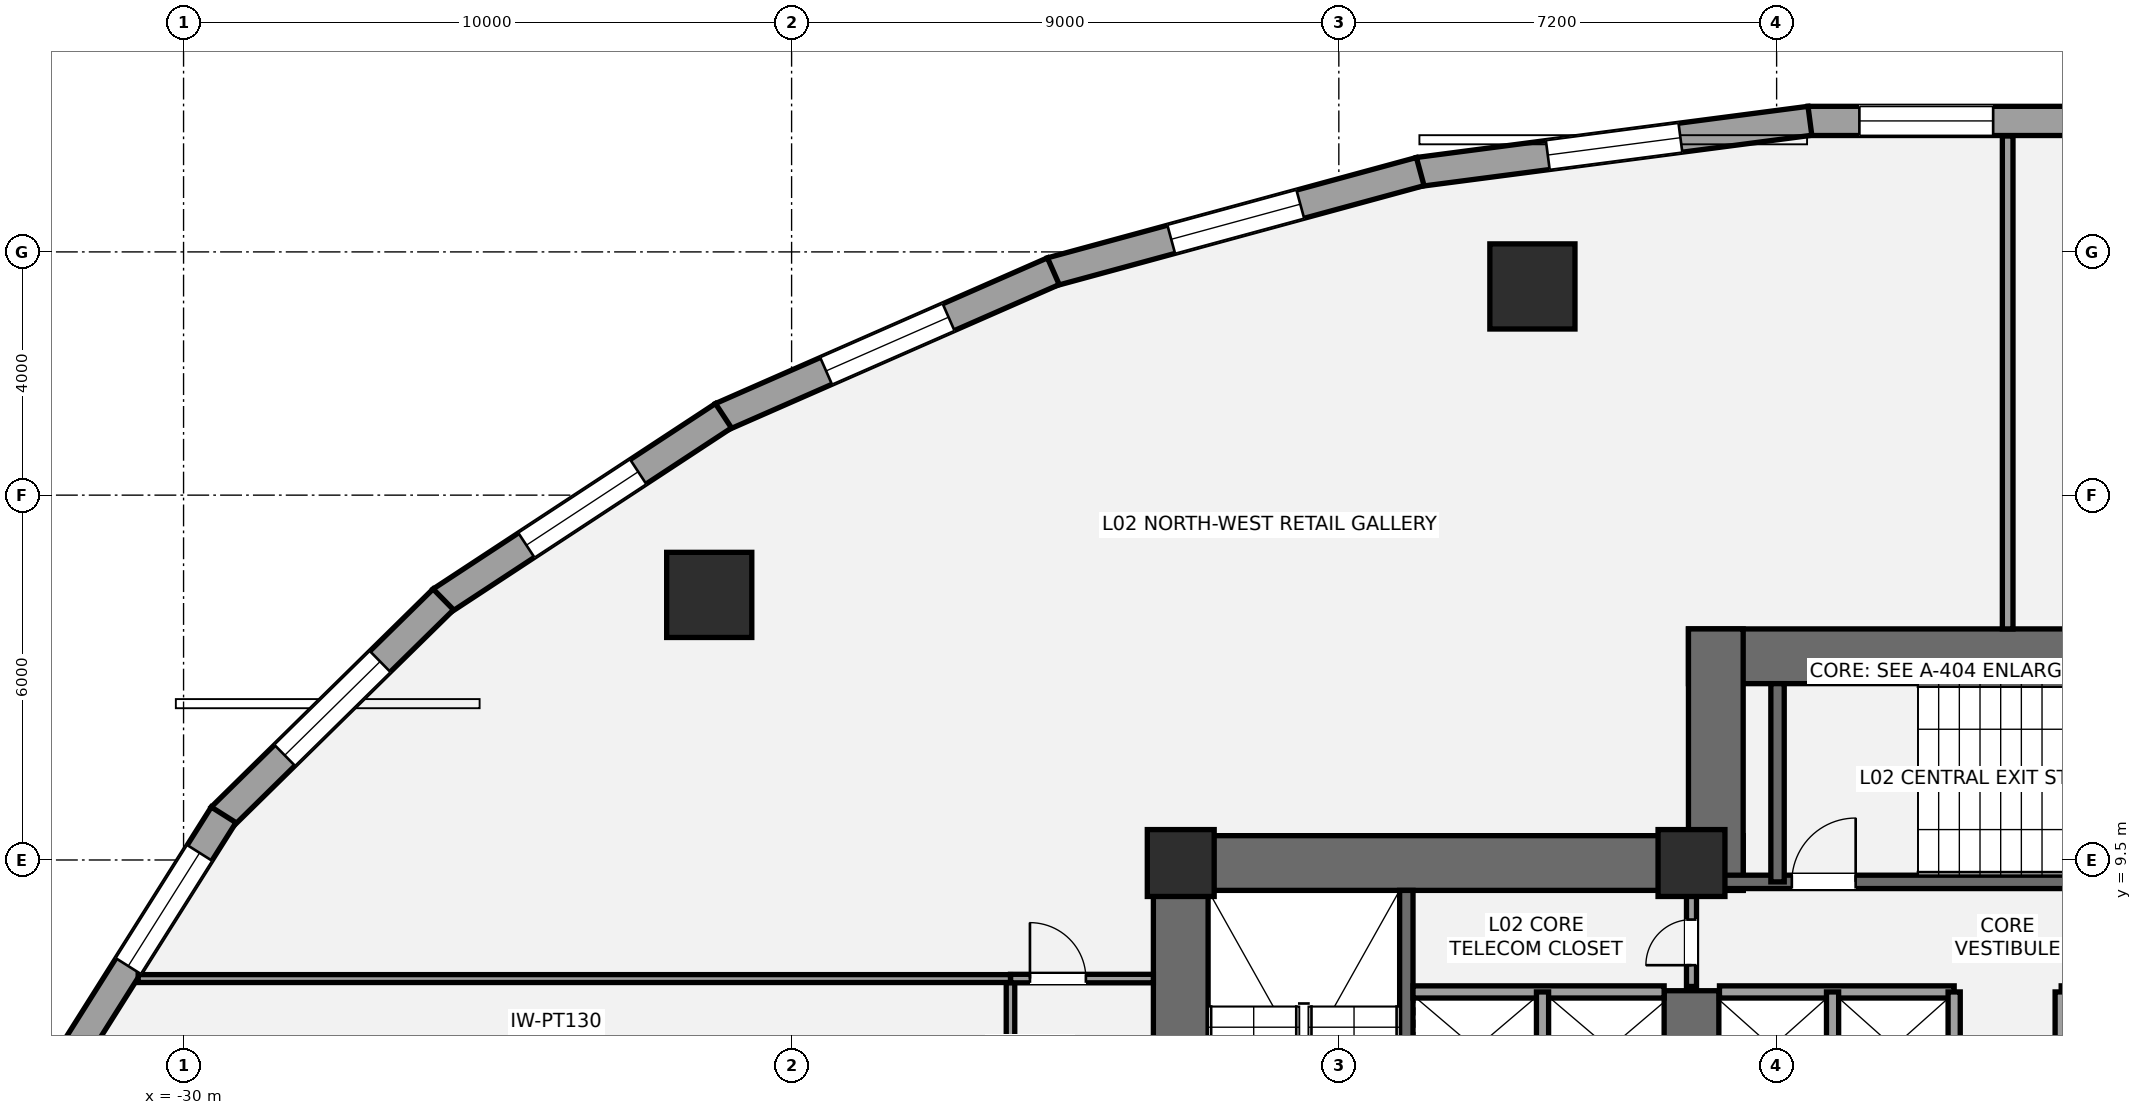
"""IFC4 building model, lengths in metres.
Left out: names, types, materials, properties, quantities, classifications, styles, units other than length and angle.
Written with IfcOpenShell. Run it as: python <this file> out.ifc"""

import sys

from ifc_helpers import new_model, si_unit, direction, frame, frame_2d, origin, origin_2d, place, context, subcontext, project, spatial, rectangle, hollow_circle, extrude, element, fill, save


model = new_model("IFC4")
c1 = context("Model", 3, precision=1e-05, world=origin(), true_north=direction((0.0, 1.0)))
c2 = subcontext(c1, "Body", "Model", "MODEL_VIEW")
j1 = project(units=[si_unit("LENGTHUNIT", "METRE"), si_unit("PLANEANGLEUNIT", "RADIAN")], contexts=[c1])
p1 = place(None, origin())
s1 = spatial("IfcSite", under=j1, at=p1, CompositionType="ELEMENT")
p2 = place(p1, origin())
s2 = spatial("IfcBuilding", under=s1, at=p2, CompositionType="ELEMENT")
p3 = place(p2, frame((0.0, 0.0, 10.2)))
s3 = spatial("IfcBuildingStorey", under=s2, at=p3, CompositionType="ELEMENT", Elevation=10.2)
p4 = place(p3, frame((-13.6, 0.95, 0.0), z_axis=(0.0, 0.0, 1.0), x_axis=(0.0, 1.0, 0.0)))
e1 = element("IfcWall", 1, at=p4, inside=s3, PredefinedType="SHEAR", context=c2, shape_type="SweptSolid", body=[
    extrude(rectangle(XDim=8.95, YDim=0.9, at=frame_2d((4.475, 0.0))), origin(), (0.0, 0.0, 1.0), 4.2),
])
p5 = place(p3, frame((-14.05, 9.45, 0.0), z_axis=(0.0, 0.0, 1.0), x_axis=(1.0, 0.0, 0.0)))
e2 = element("IfcWall", 2, at=p5, inside=s3, PredefinedType="SHEAR", context=c2, shape_type="SweptSolid", body=[
    extrude(rectangle(XDim=9.7, YDim=0.9, at=frame_2d((4.85, 0.0))), origin(), (0.0, 0.0, 1.0), 4.2),
])
p6 = place(p3, frame((-5.2, 5.35, 0.0), z_axis=(0.0, 0.0, 1.0), x_axis=(0.0, 1.0, 0.0)))
e3 = element("IfcWall", 3, at=p6, inside=s3, PredefinedType="SHEAR", context=c2, shape_type="SweptSolid", body=[
    extrude(rectangle(XDim=2.0, YDim=0.9, at=frame_2d((1.0, 0.0))), origin(), (0.0, 0.0, 1.0), 4.2),
])
p7 = place(p3, frame((-9.89, 1.85, 0.0), z_axis=(0.0, 0.0, 1.0), x_axis=(0.0, 1.0, 0.0)))
e4 = element("IfcWall", 4, at=p7, inside=s3, PredefinedType="SHEAR", context=c2, shape_type="SweptSolid", body=[
    extrude(rectangle(XDim=7.15, YDim=0.22, at=frame_2d((3.575, 0.0))), origin(), (0.0, 0.0, 1.0), 4.2),
])
p8 = place(p3, frame((-5.25, 12.85, 0.0), z_axis=(0.0, 0.0, 1.0), x_axis=(1.0, 0.0, 0.0)))
e5 = element("IfcWall", 5, at=p8, inside=s3, PredefinedType="SHEAR", context=c2, shape_type="SweptSolid", body=[
    extrude(rectangle(XDim=10.5, YDim=0.9, at=frame_2d((5.25, 0.0))), origin(), (0.0, 0.0, 1.0), 4.2),
])
p9 = place(p3, frame((-4.8, 9.0, 0.0), z_axis=(0.0, 0.0, 1.0), x_axis=(0.0, 1.0, 0.0)))
e6 = element("IfcWall", 6, at=p9, inside=s3, PredefinedType="SHEAR", context=c2, shape_type="SweptSolid", body=[
    extrude(rectangle(XDim=4.3, YDim=0.9, at=frame_2d((2.15, 0.0))), origin(), (0.0, 0.0, 1.0), 4.2),
])
p10 = place(p3, frame((-4.7, 9.14, 0.0), z_axis=(0.0, 0.0, 1.0), x_axis=(1.0, 0.0, 0.0)))
e7 = element("IfcWall", 7, at=p10, inside=s3, PredefinedType="SHEAR", context=c2, shape_type="SweptSolid", body=[
    extrude(rectangle(XDim=9.3, YDim=0.22, at=frame_2d((4.65, 0.0))), origin(), (0.0, 0.0, 1.0), 4.2),
])
p11 = place(p10, frame((1.15, 0.0, 0.0)))
e8 = element("IfcOpeningElement", 8, at=p11, cuts=e7, PredefinedType="OPENING", context=c2, shape_type="SweptSolid", body=[
    extrude(rectangle(XDim=1.05, YDim=2.15, at=frame_2d((0.525, 1.075))), frame((0.0, 0.12, 0.0), z_axis=(0.0, -1.0, 0.0), x_axis=(1.0, 0.0, 0.0)), (0.0, 0.0, 1.0), 0.24),
])
p12 = place(p3, frame((-3.785, 9.14, 0.0), z_axis=(0.0, 0.0, 1.0), x_axis=(0.0, 1.0, 0.0)))
e9 = element("IfcWall", 9, at=p12, inside=s3, PredefinedType="SHEAR", context=c2, shape_type="SweptSolid", body=[
    extrude(rectangle(XDim=3.26, YDim=0.22, at=frame_2d((1.63, 0.0))), origin(), (0.0, 0.0, 1.0), 4.2),
])
for number, where, z_axis, x_axis in (
    (10, (-13.6, 9.45, 0.0), (0.0, 0.0, 1.0), (1.0, 0.0, 0.0)),
    (11, (-5.2, 9.45, 0.0), (0.0, 0.0, 1.0), (1.0, 0.0, 0.0)),
):
    element("IfcColumn", number, at=place(p3, frame(where, z_axis=z_axis, x_axis=x_axis)), inside=s3, PredefinedType="COLUMN", context=c2, shape_type="SweptSolid", body=[
        extrude(rectangle(XDim=1.1, YDim=1.1, at=origin_2d()), origin(), (0.0, 0.0, 1.0), 4.2),
    ])
for number, where, z_axis, x_axis in (
    (12, (-7.816, 18.932, 0.0), (0.0, 0.0, 1.0), (1.0, 0.0, 0.0)),
    (13, (-21.354, 13.859, 0.0), (0.0, 0.0, 1.0), (1.0, 0.0, 0.0)),
):
    element("IfcColumn", number, at=place(p3, frame(where, z_axis=z_axis, x_axis=x_axis)), inside=s3, PredefinedType="USERDEFINED", context=c2, shape_type="SweptSolid", body=[
        extrude(hollow_circle(Radius=0.7, WallThickness=0.05, at=origin_2d()), origin(), (0.0, 0.0, 1.0), 4.2),
    ])
p13 = place(p3, frame((-3.284, 21.654, 0.0), z_axis=(0.0, 0.0, 1.0), x_axis=(1.0, 0.0, 0.0)))
e14 = element("IfcWall", 14, at=p13, inside=s3, PredefinedType="STANDARD", context=c2, shape_type="SweptSolid", body=[
    extrude(rectangle(XDim=6.567, YDim=0.48, at=frame_2d((3.284, 0.0))), origin(), (0.0, 0.0, 1.0), 3.109),
])
p14 = place(p13, frame((0.845, 0.0, 0.7)))
e15 = element("IfcOpeningElement", 15, at=p14, cuts=e14, PredefinedType="OPENING", context=c2, shape_type="SweptSolid", body=[
    extrude(rectangle(XDim=2.2, YDim=1.95, at=frame_2d((1.1, 0.975))), frame((0.0, 0.25, 0.0), z_axis=(0.0, -1.0, 0.0), x_axis=(1.0, 0.0, 0.0)), (0.0, 0.0, 1.0), 0.5),
])
p15 = place(p3, frame((-9.693, 20.815, 0.0), z_axis=(0.0, 0.0, 1.0), x_axis=(0.991576921472, 0.129519144545, 0.0)))
e16 = element("IfcWall", 16, at=p15, inside=s3, PredefinedType="STANDARD", context=c2, shape_type="SweptSolid", body=[
    extrude(rectangle(XDim=6.496, YDim=0.48, at=frame_2d((3.248, 0.0))), origin(), (0.0, 0.0, 1.0), 3.109),
])
p16 = place(p15, frame((2.148, 0.0, 0.7)))
e17 = element("IfcOpeningElement", 17, at=p16, cuts=e16, PredefinedType="OPENING", context=c2, shape_type="SweptSolid", body=[
    extrude(rectangle(XDim=2.2, YDim=1.95, at=frame_2d((1.1, 0.975))), frame((0.0, 0.25, 0.0), z_axis=(0.0, -1.0, 0.0), x_axis=(1.0, 0.0, 0.0)), (0.0, 0.0, 1.0), 0.5),
])
p17 = place(p3, frame((-15.729, 19.171, 0.0), z_axis=(0.0, 0.0, 1.0), x_axis=(0.964936550718, 0.262483243445, 0.0)))
e18 = element("IfcWall", 18, at=p17, inside=s3, PredefinedType="STANDARD", context=c2, shape_type="SweptSolid", body=[
    extrude(rectangle(XDim=6.288, YDim=0.48, at=frame_2d((3.144, 0.0))), origin(), (0.0, 0.0, 1.0), 3.109),
])
p18 = place(p17, frame((2.044, 0.0, 0.7)))
e19 = element("IfcOpeningElement", 19, at=p18, cuts=e18, PredefinedType="OPENING", context=c2, shape_type="SweptSolid", body=[
    extrude(rectangle(XDim=2.2, YDim=1.95, at=frame_2d((1.1, 0.975))), frame((0.0, 0.25, 0.0), z_axis=(0.0, -1.0, 0.0), x_axis=(1.0, 0.0, 0.0)), (0.0, 0.0, 1.0), 0.5),
])
p19 = place(p3, frame((-21.156, 16.786, 0.0), z_axis=(0.0, 0.0, 1.0), x_axis=(0.91570760638, 0.401845218484, 0.0)))
e20 = element("IfcWall", 20, at=p19, inside=s3, PredefinedType="STANDARD", context=c2, shape_type="SweptSolid", body=[
    extrude(rectangle(XDim=5.963, YDim=0.48, at=frame_2d((2.981, 0.0))), origin(), (0.0, 0.0, 1.0), 3.109),
])
p20 = place(p19, frame((1.882, 0.0, 0.7)))
e21 = element("IfcOpeningElement", 21, at=p20, cuts=e20, PredefinedType="OPENING", context=c2, shape_type="SweptSolid", body=[
    extrude(rectangle(XDim=2.2, YDim=1.95, at=frame_2d((1.1, 0.975))), frame((0.0, 0.25, 0.0), z_axis=(0.0, -1.0, 0.0), x_axis=(1.0, 0.0, 0.0)), (0.0, 0.0, 1.0), 0.5),
])
p21 = place(p3, frame((-25.764, 13.756, 0.0), z_axis=(0.0, 0.0, 1.0), x_axis=(0.835863918172, 0.548936708827, 0.0)))
e22 = element("IfcWall", 22, at=p21, inside=s3, PredefinedType="STANDARD", context=c2, shape_type="SweptSolid", body=[
    extrude(rectangle(XDim=5.555, YDim=0.48, at=frame_2d((2.778, 0.0))), origin(), (0.0, 0.0, 1.0), 3.109),
])
p22 = place(p21, frame((1.678, 0.0, 0.7)))
e23 = element("IfcOpeningElement", 23, at=p22, cuts=e22, PredefinedType="OPENING", context=c2, shape_type="SweptSolid", body=[
    extrude(rectangle(XDim=2.2, YDim=1.95, at=frame_2d((1.1, 0.975))), frame((0.0, 0.25, 0.0), z_axis=(0.0, -1.0, 0.0), x_axis=(1.0, 0.0, 0.0)), (0.0, 0.0, 1.0), 0.5),
])
p23 = place(p3, frame((-29.376, 10.199, 0.0), z_axis=(0.0, 0.0, 1.0), x_axis=(0.713189080178, 0.700971708355, 0.0)))
e24 = element("IfcWall", 24, at=p23, inside=s3, PredefinedType="STANDARD", context=c2, shape_type="SweptSolid", body=[
    extrude(rectangle(XDim=5.116, YDim=0.48, at=frame_2d((2.558, 0.0))), origin(), (0.0, 0.0, 1.0), 3.109),
])
p24 = place(p23, frame((1.458, 0.0, 0.7)))
e25 = element("IfcOpeningElement", 25, at=p24, cuts=e24, PredefinedType="OPENING", context=c2, shape_type="SweptSolid", body=[
    extrude(rectangle(XDim=2.2, YDim=1.95, at=frame_2d((1.1, 0.975))), frame((0.0, 0.25, 0.0), z_axis=(0.0, -1.0, 0.0), x_axis=(1.0, 0.0, 0.0)), (0.0, 0.0, 1.0), 0.5),
])
p25 = place(p3, frame((-31.854, 6.258, 0.0), z_axis=(0.0, 0.0, 1.0), x_axis=(0.53349762721, 0.845801561693, 0.0)))
e26 = element("IfcWall", 26, at=p25, inside=s3, PredefinedType="STANDARD", context=c2, shape_type="SweptSolid", body=[
    extrude(rectangle(XDim=4.711, YDim=0.48, at=frame_2d((2.355, 0.0))), origin(), (0.0, 0.0, 1.0), 3.109),
])
p26 = place(p25, frame((1.771, 0.0, 0.7)))
e27 = element("IfcOpeningElement", 27, at=p26, cuts=e26, PredefinedType="OPENING", context=c2, shape_type="SweptSolid", body=[
    extrude(rectangle(XDim=2.2, YDim=1.95, at=frame_2d((1.1, 0.975))), frame((0.0, 0.25, 0.0), z_axis=(0.0, -1.0, 0.0), x_axis=(1.0, 0.0, 0.0)), (0.0, 0.0, 1.0), 0.5),
])
p27 = place(p3, frame((-9.78, 7.33, 0.0), z_axis=(0.0, 0.0, 1.0), x_axis=(1.0, 0.0, 0.0)))
e28 = element("IfcWall", 28, at=p27, inside=s3, PredefinedType="SOLIDWALL", context=c2, shape_type="SweptSolid", body=[
    extrude(rectangle(XDim=4.13, YDim=0.2, at=frame_2d((2.065, 0.0))), origin(), (0.0, 0.0, 1.0), 3.98),
])
p28 = place(p3, frame((-7.65, 5.47, 0.0), z_axis=(0.0, 0.0, 1.0), x_axis=(0.0, 1.0, 0.0)))
e29 = element("IfcWall", 29, at=p28, inside=s3, PredefinedType="SOLIDWALL", context=c2, shape_type="SweptSolid", body=[
    extrude(rectangle(XDim=1.86, YDim=0.2, at=frame_2d((0.93, 0.0))), origin(), (0.0, 0.0, 1.0), 3.98),
])
for number, where, z_axis, x_axis in (
    (30, (-4.74, 7.33, 0.0), (0.0, 0.0, 1.0), (1.0, 0.0, 0.0)),
    (31, (0.88, 7.33, 0.0), (0.0, 0.0, 1.0), (1.0, 0.0, 0.0)),
):
    element("IfcWall", number, at=place(p3, frame(where, z_axis=z_axis, x_axis=x_axis)), inside=s3, PredefinedType="SOLIDWALL", context=c2, shape_type="SweptSolid", body=[
        extrude(rectangle(XDim=3.86, YDim=0.2, at=frame_2d((1.93, 0.0))), origin(), (0.0, 0.0, 1.0), 3.98),
    ])
for number, where, z_axis, x_axis in (
    (32, (-2.88, 5.52, 0.0), (0.0, 0.0, 1.0), (0.0, 1.0, 0.0)),
    (33, (-0.88, 5.52, 0.0), (0.0, 0.0, 1.0), (0.0, 1.0, 0.0)),
    (34, (0.88, 5.52, 0.0), (0.0, 0.0, 1.0), (0.0, 1.0, 0.0)),
):
    element("IfcWall", number, at=place(p3, frame(where, z_axis=z_axis, x_axis=x_axis)), inside=s3, PredefinedType="SOLIDWALL", context=c2, shape_type="SweptSolid", body=[
        extrude(rectangle(XDim=1.81, YDim=0.2, at=frame_2d((0.905, 0.0))), origin(), (0.0, 0.0, 1.0), 3.98),
    ])
p29 = place(p3, frame((-5.2, 7.42, 0.0), z_axis=(0.0, 0.0, 1.0), x_axis=(0.0, 1.0, 0.0)))
e35 = element("IfcWall", 35, at=p29, inside=s3, PredefinedType="PARTITIONING", context=c2, shape_type="SweptSolid", body=[
    extrude(rectangle(XDim=1.58, YDim=0.165, at=frame_2d((0.79, 0.0))), origin(), (0.0, 0.0, 1.0), 3.98),
])
p30 = place(p29, frame((0.35, 0.0, 0.0)))
e36 = element("IfcOpeningElement", 36, at=p30, cuts=e35, PredefinedType="OPENING", context=c2, shape_type="SweptSolid", body=[
    extrude(rectangle(XDim=0.75, YDim=2.1, at=frame_2d((0.375, 1.05))), frame((0.0, 0.093, 0.0), z_axis=(0.0, -1.0, 0.0), x_axis=(1.0, 0.0, 0.0)), (0.0, 0.0, 1.0), 0.185),
])
p31 = place(p3, frame((-16.4, -18.603, 0.0), z_axis=(0.0, 0.0, 1.0), x_axis=(0.0, 1.0, 0.0)))
e37 = element("IfcWall", 37, at=p31, inside=s3, PredefinedType="PARTITIONING", context=c2, shape_type="SweptSolid", body=[
    extrude(rectangle(XDim=26.153, YDim=0.14, at=frame_2d((13.076, 0.0))), origin(), (0.0, 0.0, 1.0), 3.348),
])
p32 = place(p31, frame((14.802, 0.0, 0.0)))
e38 = element("IfcOpeningElement", 38, at=p32, cuts=e37, PredefinedType="OPENING", context=c2, shape_type="SweptSolid", body=[
    extrude(rectangle(XDim=0.9, YDim=2.1, at=frame_2d((0.45, 1.05))), frame((0.0, 0.08, 0.0), z_axis=(0.0, -1.0, 0.0), x_axis=(1.0, 0.0, 0.0)), (0.0, 0.0, 1.0), 0.16),
])
p33 = place(p31, frame((19.552, 0.0, 0.0)))
e39 = element("IfcOpeningElement", 39, at=p33, cuts=e37, PredefinedType="OPENING", context=c2, shape_type="SweptSolid", body=[
    extrude(rectangle(XDim=0.9, YDim=2.1, at=frame_2d((0.45, 1.05))), frame((0.0, 0.08, 0.0), z_axis=(0.0, -1.0, 0.0), x_axis=(1.0, 0.0, 0.0)), (0.0, 0.0, 1.0), 0.16),
])
p34 = place(p31, frame((23.827, 0.0, 0.0)))
e40 = element("IfcOpeningElement", 40, at=p34, cuts=e37, PredefinedType="OPENING", context=c2, shape_type="SweptSolid", body=[
    extrude(rectangle(XDim=0.9, YDim=2.1, at=frame_2d((0.45, 1.05))), frame((0.0, 0.08, 0.0), z_axis=(0.0, -1.0, 0.0), x_axis=(1.0, 0.0, 0.0)), (0.0, 0.0, 1.0), 0.16),
])
p35 = place(p3, frame((-16.4, 7.55, 0.0), z_axis=(0.0, 0.0, 1.0), x_axis=(1.0, 0.0, 0.0)))
e41 = element("IfcWall", 41, at=p35, inside=s3, PredefinedType="PARTITIONING", context=c2, shape_type="SweptSolid", body=[
    extrude(rectangle(XDim=2.35, YDim=0.14, at=frame_2d((1.175, 0.0))), origin(), (0.0, 0.0, 1.0), 3.433),
])
p36 = place(p35, frame((0.32, 0.0, 0.0)))
e42 = element("IfcOpeningElement", 42, at=p36, cuts=e41, PredefinedType="OPENING", context=c2, shape_type="SweptSolid", body=[
    extrude(rectangle(XDim=0.92, YDim=2.15, at=frame_2d((0.46, 1.075))), frame((0.0, 0.08, 0.0), z_axis=(0.0, -1.0, 0.0), x_axis=(1.0, 0.0, 0.0)), (0.0, 0.0, 1.0), 0.16),
])
p37 = place(p3, frame((0.0, 13.3, 0.0), z_axis=(0.0, 0.0, 1.0), x_axis=(0.0, 1.0, 0.0)))
e43 = element("IfcWall", 43, at=p37, inside=s3, PredefinedType="PARTITIONING", context=c2, shape_type="SweptSolid", body=[
    extrude(rectangle(XDim=8.106, YDim=0.175, at=frame_2d((4.053, 0.0))), origin(), (0.0, 0.0, 1.0), 3.98),
])
p38 = place(p3, frame((-30.747, 7.55, 0.0), z_axis=(0.0, 0.0, 1.0), x_axis=(1.0, 0.0, 0.0)))
e44 = element("IfcWall", 44, at=p38, inside=s3, PredefinedType="PARTITIONING", context=c2, shape_type="SweptSolid", body=[
    extrude(rectangle(XDim=14.347, YDim=0.13, at=frame_2d((7.173, 0.0))), origin(), (0.0, 0.0, 1.0), 2.958),
])
p39 = place(p14, origin())
e45 = element("IfcWindow", 45, at=p39, inside=s3, PartitioningType="SINGLE_PANEL", PredefinedType="WINDOW", context=c2, shape_type="SweptSolid", body=[
    extrude(rectangle(XDim=2.2, YDim=1.95, at=frame_2d((1.1, 0.975))), frame((0.0, -0.01, 0.0), z_axis=(0.0, -1.0, 0.0), x_axis=(1.0, 0.0, 0.0)), (0.0, 0.0, 1.0), 0.06),
])
fill(e15, e45)
p40 = place(p16, origin())
e46 = element("IfcWindow", 46, at=p40, inside=s3, PartitioningType="SINGLE_PANEL", PredefinedType="WINDOW", context=c2, shape_type="SweptSolid", body=[
    extrude(rectangle(XDim=2.2, YDim=1.95, at=frame_2d((1.1, 0.975))), frame((0.0, -0.01, 0.0), z_axis=(0.0, -1.0, 0.0), x_axis=(1.0, 0.0, 0.0)), (0.0, 0.0, 1.0), 0.06),
])
fill(e17, e46)
p41 = place(p18, origin())
e47 = element("IfcWindow", 47, at=p41, inside=s3, PartitioningType="SINGLE_PANEL", PredefinedType="WINDOW", context=c2, shape_type="SweptSolid", body=[
    extrude(rectangle(XDim=2.2, YDim=1.95, at=frame_2d((1.1, 0.975))), frame((0.0, -0.01, 0.0), z_axis=(0.0, -1.0, 0.0), x_axis=(1.0, 0.0, 0.0)), (0.0, 0.0, 1.0), 0.06),
])
fill(e19, e47)
p42 = place(p20, origin())
e48 = element("IfcWindow", 48, at=p42, inside=s3, PartitioningType="SINGLE_PANEL", PredefinedType="WINDOW", context=c2, shape_type="SweptSolid", body=[
    extrude(rectangle(XDim=2.2, YDim=1.95, at=frame_2d((1.1, 0.975))), frame((0.0, -0.01, 0.0), z_axis=(0.0, -1.0, 0.0), x_axis=(1.0, 0.0, 0.0)), (0.0, 0.0, 1.0), 0.06),
])
fill(e21, e48)
p43 = place(p22, origin())
e49 = element("IfcWindow", 49, at=p43, inside=s3, PartitioningType="SINGLE_PANEL", PredefinedType="WINDOW", context=c2, shape_type="SweptSolid", body=[
    extrude(rectangle(XDim=2.2, YDim=1.95, at=frame_2d((1.1, 0.975))), frame((0.0, -0.01, 0.0), z_axis=(0.0, -1.0, 0.0), x_axis=(1.0, 0.0, 0.0)), (0.0, 0.0, 1.0), 0.06),
])
fill(e23, e49)
p44 = place(p24, origin())
e50 = element("IfcWindow", 50, at=p44, inside=s3, PartitioningType="SINGLE_PANEL", PredefinedType="WINDOW", context=c2, shape_type="SweptSolid", body=[
    extrude(rectangle(XDim=2.2, YDim=1.95, at=frame_2d((1.1, 0.975))), frame((0.0, -0.01, 0.0), z_axis=(0.0, -1.0, 0.0), x_axis=(1.0, 0.0, 0.0)), (0.0, 0.0, 1.0), 0.06),
])
fill(e25, e50)
p45 = place(p26, origin())
e51 = element("IfcWindow", 51, at=p45, inside=s3, PartitioningType="SINGLE_PANEL", PredefinedType="WINDOW", context=c2, shape_type="SweptSolid", body=[
    extrude(rectangle(XDim=2.2, YDim=1.95, at=frame_2d((1.1, 0.975))), frame((0.0, -0.01, 0.0), z_axis=(0.0, -1.0, 0.0), x_axis=(1.0, 0.0, 0.0)), (0.0, 0.0, 1.0), 0.06),
])
fill(e27, e51)
p46 = place(p11, origin())
e52 = element("IfcDoor", 52, at=p46, inside=s3, OperationType="SINGLE_SWING_RIGHT", PredefinedType="DOOR", context=c2, shape_type="SweptSolid", body=[
    extrude(rectangle(XDim=1.05, YDim=2.15, at=frame_2d((0.525, 1.075))), frame((0.0, 0.025, 0.0), z_axis=(0.0, -1.0, 0.0), x_axis=(1.0, 0.0, 0.0)), (0.0, 0.0, 1.0), 0.05),
])
fill(e8, e52)
p47 = place(p30, origin())
e53 = element("IfcDoor", 53, at=p47, inside=s3, OperationType="SINGLE_SWING_LEFT", PredefinedType="DOOR", context=c2, shape_type="SweptSolid", body=[
    extrude(rectangle(XDim=0.75, YDim=2.1, at=frame_2d((0.375, 1.05))), frame((0.0, 0.025, 0.0), z_axis=(0.0, -1.0, 0.0), x_axis=(1.0, 0.0, 0.0)), (0.0, 0.0, 1.0), 0.05),
])
fill(e36, e53)
p48 = place(p36, origin())
e54 = element("IfcDoor", 54, at=p48, inside=s3, OperationType="SINGLE_SWING_LEFT", PredefinedType="DOOR", context=c2, shape_type="SweptSolid", body=[
    extrude(rectangle(XDim=0.92, YDim=2.15, at=frame_2d((0.46, 1.075))), frame((0.0, 0.025, 0.0), z_axis=(0.0, -1.0, 0.0), x_axis=(1.0, 0.0, 0.0)), (0.0, 0.0, 1.0), 0.05),
])
fill(e42, e54)
save(model, sys.argv[1])
